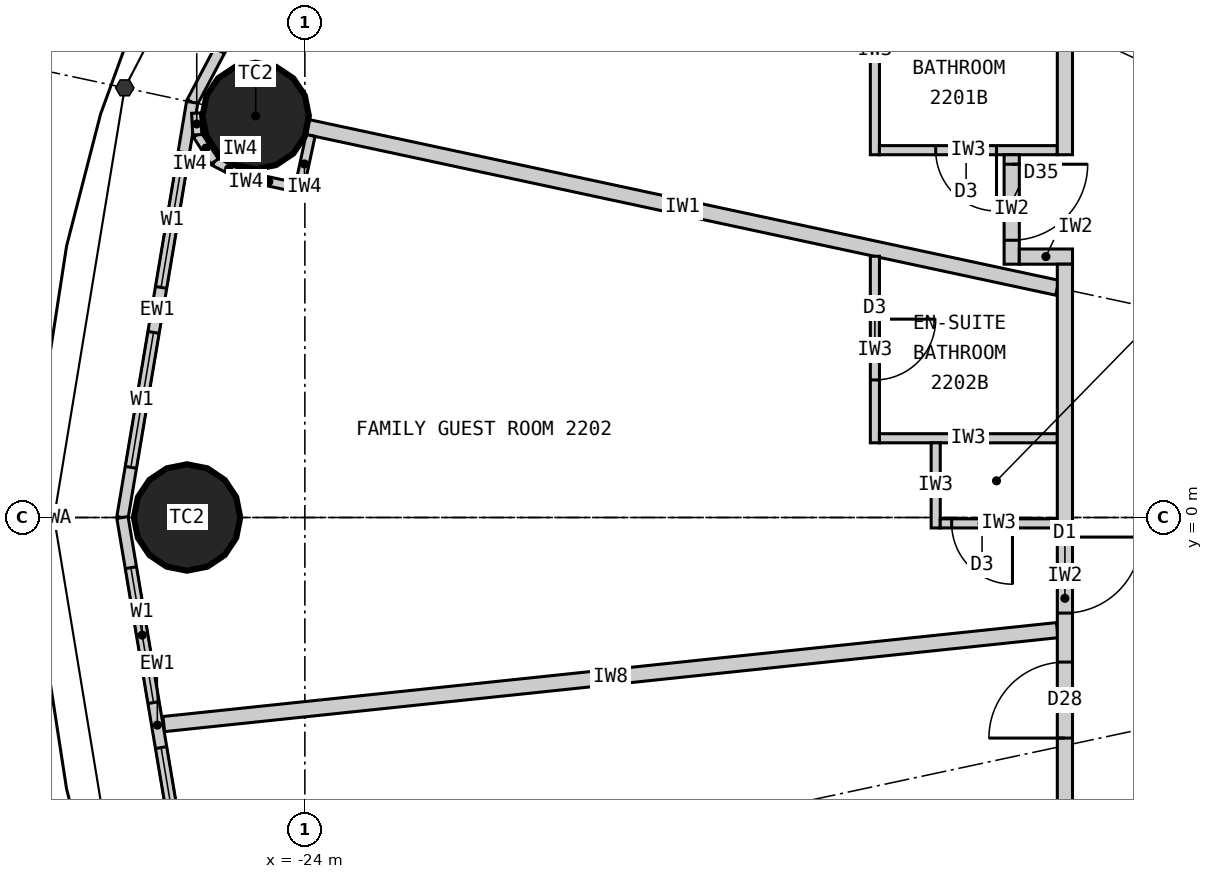
"""IFC4 building model, lengths in metres.
Left out: names, types, materials, properties, quantities, classifications, styles, units other than length and angle.
Written with IfcOpenShell. Run it as: python <this file> out.ifc"""

import sys

from ifc_helpers import new_model, si_unit, direction, frame, frame_2d, origin, origin_2d, place, context, subcontext, project, spatial, rectangle, circle, extrude, element, fill, save


model = new_model("IFC4")
c1 = context("Model", 3, precision=1e-05, world=origin(), true_north=direction((0.0, 1.0)))
c2 = subcontext(c1, "Body", "Model", "MODEL_VIEW")
j1 = project(units=[si_unit("LENGTHUNIT", "METRE"), si_unit("PLANEANGLEUNIT", "RADIAN")], contexts=[c1])
p1 = place(None, origin())
s1 = spatial("IfcSite", under=j1, at=p1, CompositionType="ELEMENT")
p2 = place(p1, origin())
s2 = spatial("IfcBuilding", under=s1, at=p2, CompositionType="ELEMENT")
p3 = place(p2, frame((0.0, 0.0, 87.0)))
s3 = spatial("IfcBuildingStorey", under=s2, at=p3, CompositionType="ELEMENT", Elevation=87.0)
for number, where, z_axis, x_axis in (
    (1, (-24.647, 5.283, 0.0), (0.0, 0.0, 1.0), (1.0, 0.0, 0.0)),
    (2, (-25.55, 0.0, 0.0), (0.0, 0.0, 1.0), (1.0, 0.0, 0.0)),
):
    element("IfcColumn", number, at=place(p3, frame(where, z_axis=z_axis, x_axis=x_axis)), inside=s3, PredefinedType="COLUMN", context=c2, shape_type="SweptSolid", body=[
        extrude(circle(Radius=0.7, at=origin_2d()), origin(), (0.0, 0.0, 1.0), 3.3),
    ])
p4 = place(p3, frame((-22.803, 10.532, 0.0), z_axis=(0.0, 0.0, 1.0), x_axis=(-0.467296867008, -0.884100468321, 0.0)))
e3 = element("IfcWall", 3, at=p4, inside=s3, PredefinedType="ELEMENTEDWALL", context=c2, shape_type="SweptSolid", body=[
    extrude(rectangle(XDim=5.734, YDim=0.15, at=frame_2d((2.867, 0.0))), origin(), (0.0, 0.0, 1.0), 3.12),
])
p5 = place(p4, frame((0.767, 0.0, 0.9)))
e4 = element("IfcOpeningElement", 4, at=p5, cuts=e3, PredefinedType="OPENING", context=c2, shape_type="SweptSolid", body=[
    extrude(rectangle(XDim=1.8, YDim=1.9, at=frame_2d((0.9, 0.95))), frame((0.0, 0.085, 0.0), z_axis=(0.0, -1.0, 0.0), x_axis=(1.0, 0.0, 0.0)), (0.0, 0.0, 1.0), 0.17),
])
p6 = place(p4, frame((3.167, 0.0, 0.9)))
e5 = element("IfcOpeningElement", 5, at=p6, cuts=e3, PredefinedType="OPENING", context=c2, shape_type="SweptSolid", body=[
    extrude(rectangle(XDim=1.8, YDim=1.9, at=frame_2d((0.9, 0.95))), frame((0.0, 0.085, 0.0), z_axis=(0.0, -1.0, 0.0), x_axis=(1.0, 0.0, 0.0)), (0.0, 0.0, 1.0), 0.17),
])
p7 = place(p3, frame((-25.482, 5.462, 0.0), z_axis=(0.0, 0.0, 1.0), x_axis=(-0.165642551694, -0.986185857264, 0.0)))
e6 = element("IfcWall", 6, at=p7, inside=s3, PredefinedType="ELEMENTEDWALL", context=c2, shape_type="SweptSolid", body=[
    extrude(rectangle(XDim=5.539, YDim=0.15, at=frame_2d((2.77, 0.0))), origin(), (0.0, 0.0, 1.0), 3.12),
])
p8 = place(p7, frame((0.669, 0.0, 0.9)))
e7 = element("IfcOpeningElement", 7, at=p8, cuts=e6, PredefinedType="OPENING", context=c2, shape_type="SweptSolid", body=[
    extrude(rectangle(XDim=1.8, YDim=1.9, at=frame_2d((0.9, 0.95))), frame((0.0, 0.085, 0.0), z_axis=(0.0, -1.0, 0.0), x_axis=(1.0, 0.0, 0.0)), (0.0, 0.0, 1.0), 0.17),
])
p9 = place(p7, frame((3.07, 0.0, 0.9)))
e8 = element("IfcOpeningElement", 8, at=p9, cuts=e6, PredefinedType="OPENING", context=c2, shape_type="SweptSolid", body=[
    extrude(rectangle(XDim=1.8, YDim=1.9, at=frame_2d((0.9, 0.95))), frame((0.0, 0.085, 0.0), z_axis=(0.0, -1.0, 0.0), x_axis=(1.0, 0.0, 0.0)), (0.0, 0.0, 1.0), 0.17),
])
p10 = place(p3, frame((-26.4, 0.0, 0.0), z_axis=(0.0, 0.0, 1.0), x_axis=(0.165642551694, -0.986185857264, 0.0)))
e9 = element("IfcWall", 9, at=p10, inside=s3, PredefinedType="ELEMENTEDWALL", context=c2, shape_type="SweptSolid", body=[
    extrude(rectangle(XDim=5.539, YDim=0.15, at=frame_2d((2.77, 0.0))), origin(), (0.0, 0.0, 1.0), 3.12),
])
p11 = place(p10, frame((0.669, 0.0, 0.9)))
e10 = element("IfcOpeningElement", 10, at=p11, cuts=e9, PredefinedType="OPENING", context=c2, shape_type="SweptSolid", body=[
    extrude(rectangle(XDim=1.8, YDim=1.9, at=frame_2d((0.9, 0.95))), frame((0.0, 0.085, 0.0), z_axis=(0.0, -1.0, 0.0), x_axis=(1.0, 0.0, 0.0)), (0.0, 0.0, 1.0), 0.17),
])
p12 = place(p10, frame((3.07, 0.0, 0.9)))
e11 = element("IfcOpeningElement", 11, at=p12, cuts=e9, PredefinedType="OPENING", context=c2, shape_type="SweptSolid", body=[
    extrude(rectangle(XDim=1.8, YDim=1.9, at=frame_2d((0.9, 0.95))), frame((0.0, 0.085, 0.0), z_axis=(0.0, -1.0, 0.0), x_axis=(1.0, 0.0, 0.0)), (0.0, 0.0, 1.0), 0.17),
])
p13 = place(p3, frame((-14.1, 3.022, 0.0), z_axis=(0.0, 0.0, 1.0), x_axis=(-0.977790014929, 0.209586943072, 0.0)))
e12 = element("IfcWall", 12, at=p13, inside=s3, PredefinedType="PARTITIONING", context=c2, shape_type="SweptSolid", body=[
    extrude(rectangle(XDim=10.087, YDim=0.2, at=frame_2d((5.043, 0.0))), origin(), (0.0, 0.0, 1.0), 2.27),
])
p14 = place(p3, frame((-14.1, -1.482, 0.0), z_axis=(0.0, 0.0, 1.0), x_axis=(-0.994522076235, -0.104526742422, 0.0)))
e13 = element("IfcWall", 13, at=p14, inside=s3, PredefinedType="PARTITIONING", context=c2, shape_type="SweptSolid", body=[
    extrude(rectangle(XDim=11.821, YDim=0.2, at=frame_2d((5.91, 0.0))), origin(), (0.0, 0.0, 1.0), 2.27),
])
p15 = place(p3, frame((-16.5, 7.521, 0.0), z_axis=(0.0, 0.0, 1.0), x_axis=(0.0, -1.0, 0.0)))
e14 = element("IfcWall", 14, at=p15, inside=s3, PredefinedType="PARTITIONING", context=c2, shape_type="SweptSolid", body=[
    extrude(rectangle(XDim=2.749, YDim=0.12, at=frame_2d((1.374, 0.0))), origin(), (0.0, 0.0, 1.0), 3.12),
])
p16 = place(p3, frame((-14.1, 4.833, 0.0), z_axis=(0.0, 0.0, 1.0), x_axis=(-1.0, 0.0, 0.0)))
e15 = element("IfcWall", 15, at=p16, inside=s3, PredefinedType="PARTITIONING", context=c2, shape_type="SweptSolid", body=[
    extrude(rectangle(XDim=2.34, YDim=0.12, at=frame_2d((1.17, 0.0))), origin(), (0.0, 0.0, 1.0), 3.12),
])
p17 = place(p16, frame((0.8, 0.0, 0.0)))
e16 = element("IfcOpeningElement", 16, at=p17, cuts=e15, PredefinedType="OPENING", context=c2, shape_type="SweptSolid", body=[
    extrude(rectangle(XDim=0.8, YDim=2.1, at=frame_2d((0.4, 1.05))), frame((0.0, 0.07, 0.0), z_axis=(0.0, -1.0, 0.0), x_axis=(1.0, 0.0, 0.0)), (0.0, 0.0, 1.0), 0.14),
])
p18 = place(p3, frame((-16.5, 3.437, 0.0), z_axis=(0.0, 0.0, 1.0), x_axis=(0.0, -1.0, 0.0)))
e17 = element("IfcWall", 17, at=p18, inside=s3, PredefinedType="PARTITIONING", context=c2, shape_type="SweptSolid", body=[
    extrude(rectangle(XDim=2.455, YDim=0.12, at=frame_2d((1.227, 0.0))), origin(), (0.0, 0.0, 1.0), 3.12),
])
p19 = place(p18, frame((0.827, 0.0, 0.0)))
e18 = element("IfcOpeningElement", 18, at=p19, cuts=e17, PredefinedType="OPENING", context=c2, shape_type="SweptSolid", body=[
    extrude(rectangle(XDim=0.8, YDim=2.1, at=frame_2d((0.4, 1.05))), frame((0.0, 0.07, 0.0), z_axis=(0.0, -1.0, 0.0), x_axis=(1.0, 0.0, 0.0)), (0.0, 0.0, 1.0), 0.14),
])
p20 = place(p3, frame((-14.1, 1.042, 0.0), z_axis=(0.0, 0.0, 1.0), x_axis=(-1.0, 0.0, 0.0)))
e19 = element("IfcWall", 19, at=p20, inside=s3, PredefinedType="PARTITIONING", context=c2, shape_type="SweptSolid", body=[
    extrude(rectangle(XDim=2.34, YDim=0.12, at=frame_2d((1.17, 0.0))), origin(), (0.0, 0.0, 1.0), 3.12),
])
p21 = place(p3, frame((-15.7, 0.982, 0.0), z_axis=(0.0, 0.0, 1.0), x_axis=(0.0, -1.0, 0.0)))
e20 = element("IfcWall", 20, at=p21, inside=s3, PredefinedType="PARTITIONING", context=c2, shape_type="SweptSolid", body=[
    extrude(rectangle(XDim=1.12, YDim=0.12, at=frame_2d((0.56, 0.0))), origin(), (0.0, 0.0, 1.0), 3.12),
])
p22 = place(p3, frame((-14.1, -0.078, 0.0), z_axis=(0.0, 0.0, 1.0), x_axis=(-1.0, 0.0, 0.0)))
e21 = element("IfcWall", 21, at=p22, inside=s3, PredefinedType="PARTITIONING", context=c2, shape_type="SweptSolid", body=[
    extrude(rectangle(XDim=1.54, YDim=0.12, at=frame_2d((0.77, 0.0))), origin(), (0.0, 0.0, 1.0), 2.22),
])
p23 = place(p22, frame((0.59, 0.0, 0.0)))
e22 = element("IfcOpeningElement", 22, at=p23, cuts=e21, PredefinedType="OPENING", context=c2, shape_type="SweptSolid", body=[
    extrude(rectangle(XDim=0.8, YDim=2.1, at=frame_2d((0.4, 1.05))), frame((0.0, 0.07, 0.0), z_axis=(0.0, -1.0, 0.0), x_axis=(1.0, 0.0, 0.0)), (0.0, 0.0, 1.0), 0.14),
])
p24 = place(p3, frame((-14.7, 4.772, 0.0), z_axis=(0.0, 0.0, 1.0), x_axis=(0.0, -1.0, 0.0)))
e23 = element("IfcWall", 23, at=p24, inside=s3, PredefinedType="PARTITIONING", context=c2, shape_type="SweptSolid", body=[
    extrude(rectangle(XDim=1.44, YDim=0.2, at=frame_2d((0.72, 0.0))), origin(), (0.0, 0.0, 1.0), 3.12),
])
p25 = place(p24, frame((0.125, 0.0, 0.0)))
e24 = element("IfcOpeningElement", 24, at=p25, cuts=e23, PredefinedType="OPENING", context=c2, shape_type="SweptSolid", body=[
    extrude(rectangle(XDim=1.0, YDim=2.0, at=frame_2d((0.5, 1.0))), frame((0.0, 0.11, 0.0), z_axis=(0.0, -1.0, 0.0), x_axis=(1.0, 0.0, 0.0)), (0.0, 0.0, 1.0), 0.22),
])
p26 = place(p3, frame((-13.9, 3.433, 0.0), z_axis=(0.0, 0.0, 1.0), x_axis=(-1.0, 0.0, 0.0)))
e25 = element("IfcWall", 25, at=p26, inside=s3, PredefinedType="PARTITIONING", context=c2, shape_type="SweptSolid", body=[
    extrude(rectangle(XDim=0.7, YDim=0.2, at=frame_2d((0.35, 0.0))), origin(), (0.0, 0.0, 1.0), 2.27),
])
p27 = place(p3, frame((-14.0, 9.9, 0.0), z_axis=(0.0, 0.0, 1.0), x_axis=(0.0, -1.0, 0.0)))
e26 = element("IfcWall", 26, at=p27, inside=s3, PredefinedType="PARTITIONING", context=c2, shape_type="SweptSolid", body=[
    extrude(rectangle(XDim=5.127, YDim=0.2, at=frame_2d((2.564, 0.0))), origin(), (0.0, 0.0, 1.0), 3.12),
])
p28 = place(p27, frame((0.103, 0.0, 0.0)))
e27 = element("IfcOpeningElement", 27, at=p28, cuts=e26, PredefinedType="OPENING", context=c2, shape_type="SweptSolid", body=[
    extrude(rectangle(XDim=1.0, YDim=2.2, at=frame_2d((0.5, 1.1))), frame((0.0, 0.11, 0.0), z_axis=(0.0, -1.0, 0.0), x_axis=(1.0, 0.0, 0.0)), (0.0, 0.0, 1.0), 0.22),
])
p29 = place(p3, frame((-14.0, 3.333, 0.0), z_axis=(0.0, 0.0, 1.0), x_axis=(0.0, -1.0, 0.0)))
e28 = element("IfcWall", 28, at=p29, inside=s3, PredefinedType="PARTITIONING", context=c2, shape_type="SweptSolid", body=[
    extrude(rectangle(XDim=8.792, YDim=0.2, at=frame_2d((4.396, 0.0))), origin(), (0.0, 0.0, 1.0), 3.12),
])
p30 = place(p29, frame((3.59, 0.0, 0.0)))
e29 = element("IfcOpeningElement", 29, at=p30, cuts=e28, PredefinedType="OPENING", context=c2, shape_type="SweptSolid", body=[
    extrude(rectangle(XDim=1.0, YDim=2.2, at=frame_2d((0.5, 1.1))), frame((0.0, 0.11, 0.0), z_axis=(0.0, -1.0, 0.0), x_axis=(1.0, 0.0, 0.0)), (0.0, 0.0, 1.0), 0.22),
])
p31 = place(p29, frame((5.234, 0.0, 0.0)))
e30 = element("IfcOpeningElement", 30, at=p31, cuts=e28, PredefinedType="OPENING", context=c2, shape_type="SweptSolid", body=[
    extrude(rectangle(XDim=1.0, YDim=2.2, at=frame_2d((0.5, 1.1))), frame((0.0, 0.11, 0.0), z_axis=(0.0, -1.0, 0.0), x_axis=(1.0, 0.0, 0.0)), (0.0, 0.0, 1.0), 0.22),
])
p32 = place(p3, frame((-23.925, 5.026, 0.0), z_axis=(0.0, 0.0, 1.0), x_axis=(-0.209681192172, -0.977769808109, 0.0)))
e31 = element("IfcWall", 31, at=p32, inside=s3, PredefinedType="PARTITIONING", context=c2, shape_type="SweptSolid", body=[
    extrude(rectangle(XDim=0.767, YDim=0.12, at=frame_2d((0.384, 0.0))), origin(), (0.0, 0.0, 1.0), 3.12),
])
p33 = place(p3, frame((-24.132, 4.347, 0.0), z_axis=(0.0, 0.0, 1.0), x_axis=(-0.977776882509, 0.209648200638, 0.0)))
e32 = element("IfcWall", 32, at=p33, inside=s3, PredefinedType="PARTITIONING", context=c2, shape_type="SweptSolid", body=[
    extrude(rectangle(XDim=0.7, YDim=0.12, at=frame_2d((0.35, 0.0))), origin(), (0.0, 0.0, 1.0), 3.12),
])
for number, where, z_axis, x_axis in (
    (33, (-24.816, 4.494, 0.0), (0.0, 0.0, 1.0), (-0.89, 0.455, 0.0)),
    (34, (-25.188, 4.684, 0.0), (0.0, 0.0, 1.0), (-0.543, 0.84, 0.0)),
):
    element("IfcWall", number, at=place(p3, frame(where, z_axis=z_axis, x_axis=x_axis)), inside=s3, PredefinedType="PARTITIONING", context=c2, shape_type="SweptSolid", body=[
        extrude(rectangle(XDim=0.418, YDim=0.12, at=frame_2d((0.209, 0.0))), origin(), (0.0, 0.0, 1.0), 3.12),
    ])
p34 = place(p3, frame((-25.416, 5.035, 0.0), z_axis=(0.0, 0.0, 1.0), x_axis=(-0.050406329159, 0.998728793007, 0.0)))
e35 = element("IfcWall", 35, at=p34, inside=s3, PredefinedType="PARTITIONING", context=c2, shape_type="SweptSolid", body=[
    extrude(rectangle(XDim=0.286, YDim=0.12, at=frame_2d((0.143, 0.0))), origin(), (0.0, 0.0, 1.0), 3.12),
])
p35 = place(p8, origin())
e36 = element("IfcWindow", 36, at=p35, inside=s3, PartitioningType="SINGLE_PANEL", PredefinedType="WINDOW", context=c2, shape_type="SweptSolid", body=[
    extrude(rectangle(XDim=1.8, YDim=1.9, at=frame_2d((0.9, 0.95))), frame((0.0, 0.03, 0.0), z_axis=(0.0, -1.0, 0.0), x_axis=(1.0, 0.0, 0.0)), (0.0, 0.0, 1.0), 0.06),
])
fill(e7, e36)
p36 = place(p9, origin())
e37 = element("IfcWindow", 37, at=p36, inside=s3, PartitioningType="SINGLE_PANEL", PredefinedType="WINDOW", context=c2, shape_type="SweptSolid", body=[
    extrude(rectangle(XDim=1.8, YDim=1.9, at=frame_2d((0.9, 0.95))), frame((0.0, 0.03, 0.0), z_axis=(0.0, -1.0, 0.0), x_axis=(1.0, 0.0, 0.0)), (0.0, 0.0, 1.0), 0.06),
])
fill(e8, e37)
p37 = place(p11, origin())
e38 = element("IfcWindow", 38, at=p37, inside=s3, PartitioningType="SINGLE_PANEL", PredefinedType="WINDOW", context=c2, shape_type="SweptSolid", body=[
    extrude(rectangle(XDim=1.8, YDim=1.9, at=frame_2d((0.9, 0.95))), frame((0.0, 0.03, 0.0), z_axis=(0.0, -1.0, 0.0), x_axis=(1.0, 0.0, 0.0)), (0.0, 0.0, 1.0), 0.06),
])
fill(e10, e38)
p38 = place(p12, origin())
e39 = element("IfcWindow", 39, at=p38, inside=s3, PartitioningType="SINGLE_PANEL", PredefinedType="WINDOW", context=c2, shape_type="SweptSolid", body=[
    extrude(rectangle(XDim=1.8, YDim=1.9, at=frame_2d((0.9, 0.95))), frame((0.0, 0.03, 0.0), z_axis=(0.0, -1.0, 0.0), x_axis=(1.0, 0.0, 0.0)), (0.0, 0.0, 1.0), 0.06),
])
fill(e11, e39)
p39 = place(p17, origin())
e40 = element("IfcDoor", 40, at=p39, inside=s3, OperationType="SINGLE_SWING_LEFT", PredefinedType="DOOR", context=c2, shape_type="SweptSolid", body=[
    extrude(rectangle(XDim=0.8, YDim=2.1, at=frame_2d((0.4, 1.05))), frame((0.0, 0.025, 0.0), z_axis=(0.0, -1.0, 0.0), x_axis=(1.0, 0.0, 0.0)), (0.0, 0.0, 1.0), 0.05),
])
fill(e16, e40)
p40 = place(p25, origin())
e41 = element("IfcDoor", 41, at=p40, inside=s3, OperationType="SINGLE_SWING_LEFT", PredefinedType="DOOR", context=c2, shape_type="SweptSolid", body=[
    extrude(rectangle(XDim=1.0, YDim=2.0, at=frame_2d((0.5, 1.0))), frame((0.0, 0.025, 0.0), z_axis=(0.0, -1.0, 0.0), x_axis=(1.0, 0.0, 0.0)), (0.0, 0.0, 1.0), 0.05),
])
fill(e24, e41)
p41 = place(p19, origin())
e42 = element("IfcDoor", 42, at=p41, inside=s3, OperationType="SINGLE_SWING_LEFT", PredefinedType="DOOR", context=c2, shape_type="SweptSolid", body=[
    extrude(rectangle(XDim=0.8, YDim=2.1, at=frame_2d((0.4, 1.05))), frame((0.0, 0.025, 0.0), z_axis=(0.0, -1.0, 0.0), x_axis=(1.0, 0.0, 0.0)), (0.0, 0.0, 1.0), 0.05),
])
fill(e18, e42)
p42 = place(p23, origin())
e43 = element("IfcDoor", 43, at=p42, inside=s3, OperationType="SINGLE_SWING_LEFT", PredefinedType="DOOR", context=c2, shape_type="SweptSolid", body=[
    extrude(rectangle(XDim=0.8, YDim=2.1, at=frame_2d((0.4, 1.05))), frame((0.0, 0.025, 0.0), z_axis=(0.0, -1.0, 0.0), x_axis=(1.0, 0.0, 0.0)), (0.0, 0.0, 1.0), 0.05),
])
fill(e22, e43)
p43 = place(p30, origin())
e44 = element("IfcDoor", 44, at=p43, inside=s3, OperationType="SINGLE_SWING_LEFT", PredefinedType="DOOR", context=c2, shape_type="SweptSolid", body=[
    extrude(rectangle(XDim=1.0, YDim=2.2, at=frame_2d((0.5, 1.1))), frame((0.0, 0.025, 0.0), z_axis=(0.0, -1.0, 0.0), x_axis=(1.0, 0.0, 0.0)), (0.0, 0.0, 1.0), 0.05),
])
fill(e29, e44)
p44 = place(p31, origin())
e45 = element("IfcDoor", 45, at=p44, inside=s3, OperationType="SINGLE_SWING_RIGHT", PredefinedType="DOOR", context=c2, shape_type="SweptSolid", body=[
    extrude(rectangle(XDim=1.0, YDim=2.2, at=frame_2d((0.5, 1.1))), frame((0.0, 0.025, 0.0), z_axis=(0.0, -1.0, 0.0), x_axis=(1.0, 0.0, 0.0)), (0.0, 0.0, 1.0), 0.05),
])
fill(e30, e45)
save(model, sys.argv[1])
